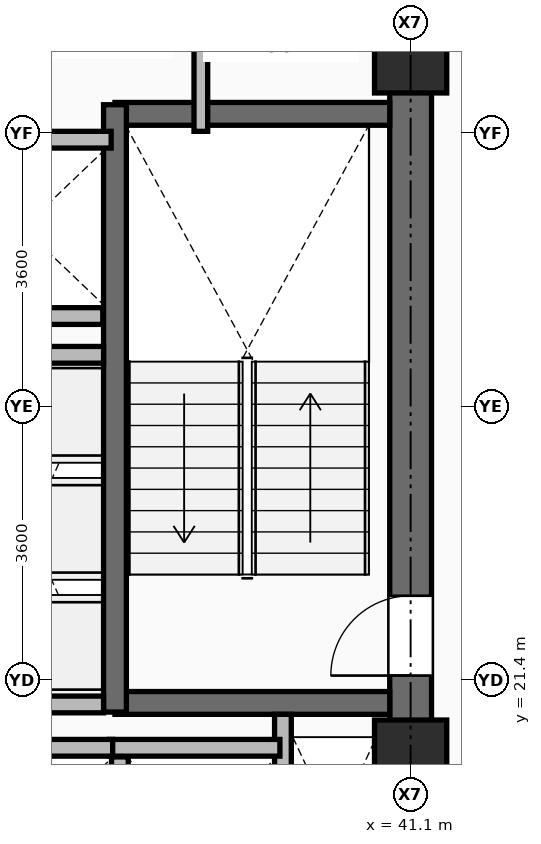
"""IFC4 building model, lengths in metres.
Left out: names, types, materials, properties, quantities, classifications, styles, units other than length and angle.
Written with IfcOpenShell. Run it as: python <this file> out.ifc"""

import sys

from ifc_helpers import new_model, si_unit, direction, frame, frame_2d, origin, origin_2d, place, context, subcontext, project, spatial, rectangle, extrude, element, fill, save


model = new_model("IFC4")
c1 = context("Model", 3, precision=1e-05, world=origin(), true_north=direction((0.0, 1.0)))
c2 = subcontext(c1, "Body", "Model", "MODEL_VIEW")
j1 = project(units=[si_unit("LENGTHUNIT", "METRE"), si_unit("PLANEANGLEUNIT", "RADIAN")], contexts=[c1])
p1 = place(None, origin())
s1 = spatial("IfcSite", under=j1, at=p1, CompositionType="ELEMENT")
p2 = place(p1, origin())
s2 = spatial("IfcBuilding", under=s1, at=p2, CompositionType="ELEMENT")
p3 = place(p2, frame((0.0, 0.0, 149.7)))
s3 = spatial("IfcBuildingStorey", under=s2, at=p3, CompositionType="ELEMENT", Elevation=149.7)
for number, where, z_axis, x_axis in (
    (1, (41.1, 20.4, 0.0), (0.0, 0.0, 1.0), (1.0, 0.0, 0.0)),
    (2, (41.1, 29.6, 0.0), (0.0, 0.0, 1.0), (1.0, 0.0, 0.0)),
):
    element("IfcColumn", number, at=place(p3, frame(where, z_axis=z_axis, x_axis=x_axis)), inside=s3, PredefinedType="COLUMN", context=c2, shape_type="SweptSolid", body=[
        extrude(rectangle(XDim=0.95, YDim=0.95, at=origin_2d()), origin(), (0.0, 0.0, 1.0), 3.75),
    ])
p4 = place(p3, frame((37.275, 18.08, 0.0), z_axis=(0.0, 0.0, 1.0), x_axis=(0.0, 1.0, 0.0)))
e3 = element("IfcWall", 3, at=p4, inside=s3, PredefinedType="PARTITIONING", context=c2, shape_type="SweptSolid", body=[
    extrude(rectangle(XDim=2.31, YDim=0.22, at=frame_2d((1.155, 0.0))), origin(), (0.0, 0.0, 1.0), 3.545),
])
p5 = place(p3, frame((34.91, 26.19, 0.0), z_axis=(0.0, 0.0, 1.0), x_axis=(1.0, 0.0, 0.0)))
e4 = element("IfcWall", 4, at=p5, inside=s3, PredefinedType="PARTITIONING", context=c2, shape_type="SweptSolid", body=[
    extrude(rectangle(XDim=2.14, YDim=0.22, at=frame_2d((1.07, 0.0))), origin(), (0.0, 0.0, 1.0), 3.545),
])
p6 = place(p3, frame((41.1, 18.075, 0.0), z_axis=(0.0, 0.0, 1.0), x_axis=(0.0, 1.0, 0.0)))
e5 = element("IfcWall", 5, at=p6, inside=s3, PredefinedType="SHEAR", context=c2, shape_type="SweptSolid", body=[
    extrude(rectangle(XDim=14.1, YDim=0.55, at=frame_2d((7.05, 0.0))), origin(), (0.0, 0.0, 1.0), 3.57),
])
p7 = place(p6, frame((3.385, 0.0, 0.0)))
e6 = element("IfcOpeningElement", 6, at=p7, cuts=e5, PredefinedType="OPENING", context=c2, shape_type="SweptSolid", body=[
    extrude(rectangle(XDim=1.05, YDim=2.1, at=frame_2d((0.525, 1.05))), frame((0.0, 0.285, 0.0), z_axis=(0.0, -1.0, 0.0), x_axis=(1.0, 0.0, 0.0)), (0.0, 0.0, 1.0), 0.57),
])
for number, where, z_axis, x_axis in (
    (7, (37.21, 21.1, 0.0), (0.0, 0.0, 1.0), (1.0, 0.0, 0.0)),
    (8, (37.21, 28.85, 0.0), (0.0, 0.0, 1.0), (1.0, 0.0, 0.0)),
):
    element("IfcWall", number, at=place(p3, frame(where, z_axis=z_axis, x_axis=x_axis)), inside=s3, PredefinedType="SHEAR", context=c2, shape_type="SweptSolid", body=[
        extrude(rectangle(XDim=3.615, YDim=0.3, at=frame_2d((1.808, 0.0))), origin(), (0.0, 0.0, 1.0), 3.57),
    ])
p8 = place(p3, frame((37.21, 20.98, 0.0), z_axis=(0.0, 0.0, 1.0), x_axis=(0.0, 1.0, 0.0)))
e9 = element("IfcWall", 9, at=p8, inside=s3, PredefinedType="SHEAR", context=c2, shape_type="SweptSolid", body=[
    extrude(rectangle(XDim=7.99, YDim=0.3, at=frame_2d((3.995, 0.0))), origin(), (0.0, 0.0, 1.0), 3.57),
])
p9 = place(p3, frame((39.42, 18.075, 0.0), z_axis=(0.0, 0.0, 1.0), x_axis=(0.0, 1.0, 0.0)))
e10 = element("IfcWall", 10, at=p9, inside=s3, PredefinedType="PARTITIONING", context=c2, shape_type="SweptSolid", body=[
    extrude(rectangle(XDim=2.875, YDim=0.22, at=frame_2d((1.438, 0.0))), origin(), (0.0, 0.0, 1.0), 3.55),
])
for number, where, z_axis, x_axis in (
    (11, (37.14, 20.51, 0.0), (0.0, 0.0, 1.0), (1.0, 0.0, 0.0)),
    (12, (34.94, 20.51, 0.0), (0.0, 0.0, 1.0), (1.0, 0.0, 0.0)),
):
    element("IfcWall", number, at=place(p3, frame(where, z_axis=z_axis, x_axis=x_axis)), inside=s3, PredefinedType="PARTITIONING", context=c2, shape_type="SweptSolid", body=[
        extrude(rectangle(XDim=2.24, YDim=0.22, at=frame_2d((1.12, 0.0))), origin(), (0.0, 0.0, 1.0), 3.55),
    ])
p10 = place(p3, frame((35.56, 28.51, 0.0), z_axis=(0.0, 0.0, 1.0), x_axis=(1.0, 0.0, 0.0)))
e13 = element("IfcWall", 13, at=p10, inside=s3, PredefinedType="PARTITIONING", context=c2, shape_type="SweptSolid", body=[
    extrude(rectangle(XDim=1.6, YDim=0.22, at=frame_2d((0.8, 0.0))), origin(), (0.0, 0.0, 1.0), 3.55),
])
for number, where, z_axis, x_axis in (
    (14, (35.12, 21.08, 0.0), (0.0, 0.0, 1.0), (1.0, 0.0, 0.0)),
    (15, (35.12, 25.68, 0.0), (0.0, 0.0, 1.0), (1.0, 0.0, 0.0)),
):
    element("IfcWall", number, at=place(p3, frame(where, z_axis=z_axis, x_axis=x_axis)), inside=s3, PredefinedType="PARTITIONING", context=c2, shape_type="SweptSolid", body=[
        extrude(rectangle(XDim=1.94, YDim=0.22, at=frame_2d((0.97, 0.0))), origin(), (0.0, 0.0, 1.0), 3.55),
    ])
p11 = place(p3, frame((38.34, 28.62, 0.0), z_axis=(0.0, 0.0, 1.0), x_axis=(0.0, 1.0, 0.0)))
e16 = element("IfcWall", 16, at=p11, inside=s3, PredefinedType="PARTITIONING", context=c2, shape_type="SweptSolid", body=[
    extrude(rectangle(XDim=3.555, YDim=0.18, at=frame_2d((1.777, 0.0))), origin(), (0.0, 0.0, 1.0), 3.55),
])
p12 = place(p7, origin())
e17 = element("IfcDoor", 17, at=p12, inside=s3, OperationType="SINGLE_SWING_LEFT", PredefinedType="DOOR", context=c2, shape_type="SweptSolid", body=[
    extrude(rectangle(XDim=1.05, YDim=2.1, at=frame_2d((0.525, 1.05))), frame((0.0, 0.025, 0.0), z_axis=(0.0, -1.0, 0.0), x_axis=(1.0, 0.0, 0.0)), (0.0, 0.0, 1.0), 0.05),
])
fill(e6, e17)
save(model, sys.argv[1])
